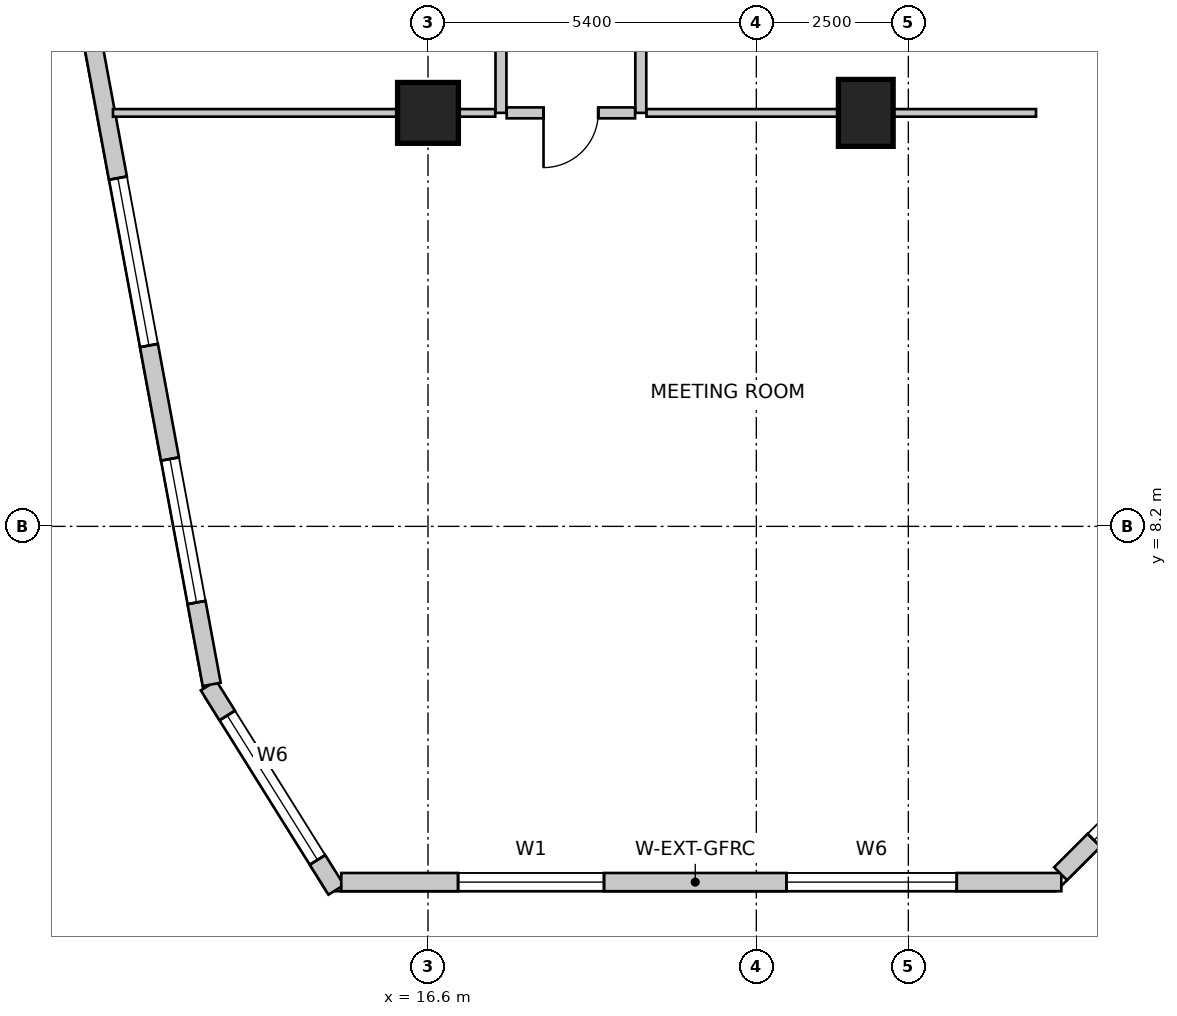
"""IFC4 building model, lengths in metres.
Left out: names, types, materials, properties, quantities, classifications, styles, units other than length and angle.
Written with IfcOpenShell. Run it as: python <this file> out.ifc"""

import sys

from ifc_helpers import new_model, si_unit, direction, frame, frame_2d, origin, origin_2d, place, context, subcontext, project, spatial, rectangle, extrude, source, transform, mapped, element, fill, save


model = new_model("IFC4")
c1 = context("Model", 3, precision=1e-05, world=origin(), true_north=direction((0.0, 1.0)))
c2 = subcontext(c1, "Body", "Model", "MODEL_VIEW")
j1 = project(units=[si_unit("LENGTHUNIT", "METRE"), si_unit("PLANEANGLEUNIT", "RADIAN")], contexts=[c1])
p1 = place(None, origin())
s1 = spatial("IfcSite", under=j1, at=p1, CompositionType="ELEMENT")
p2 = place(p1, origin())
s2 = spatial("IfcBuilding", under=s1, at=p2, CompositionType="ELEMENT")
p3 = place(p2, frame((0.0, 0.0, 47.0)))
s3 = spatial("IfcBuildingStorey", under=s2, at=p3, CompositionType="ELEMENT", Elevation=47.0)
m1 = source(origin(), c2, "Body", "SweptSolid", [
    extrude(rectangle(XDim=0.9, YDim=1.1, at=origin_2d()), origin(), (0.0, 0.0, 1.0), 4.0),
])
p4 = place(p3, frame((23.8, 15.0, 0.0), z_axis=(0.0, 0.0, 1.0), x_axis=(1.0, 0.0, 0.0)))
e1 = element("IfcColumn", 1, at=p4, inside=s3, PredefinedType="COLUMN", context=c2, shape_type="MappedRepresentation", body=[
    mapped(m1, transform((0.0, 0.0, 0.0), scale=1.0)),
])
m2 = source(origin(), c2, "Body", "SweptSolid", [
    extrude(rectangle(XDim=1.0, YDim=1.0, at=origin_2d()), origin(), (0.0, 0.0, 1.0), 4.0),
])
p5 = place(p3, frame((16.6, 15.0, 0.0), z_axis=(0.0, 0.0, 1.0), x_axis=(1.0, 0.0, 0.0)))
e2 = element("IfcColumn", 2, at=p5, inside=s3, PredefinedType="COLUMN", context=c2, shape_type="MappedRepresentation", body=[
    mapped(m2, transform((0.0, 0.0, 0.0), scale=1.0)),
])
p6 = place(p3, frame((12.991, 5.583, 0.0), z_axis=(0.0, 0.0, 1.0), x_axis=(0.530015557218, -0.847987918019, 0.0)))
e3 = element("IfcWall", 3, at=p6, inside=s3, PredefinedType="SOLIDWALL", context=c2, shape_type="SweptSolid", body=[
    extrude(rectangle(XDim=3.962, YDim=0.3, at=frame_2d((1.981, 0.0))), origin(), (0.0, 0.0, 1.0), 3.75),
])
m3 = source(origin(), c2, "Body", "SweptSolid", [
    extrude(rectangle(XDim=2.8, YDim=2.4, at=frame_2d((1.4, 1.2))), frame((0.0, 0.16, 0.0), z_axis=(0.0, -1.0, 0.0), x_axis=(1.0, 0.0, 0.0)), (0.0, 0.0, 1.0), 0.32),
])
p7 = place(p6, frame((0.581, 0.0, 0.85)))
e4 = element("IfcOpeningElement", 4, at=p7, cuts=e3, PredefinedType="OPENING", context=c2, shape_type="MappedRepresentation", body=[
    mapped(m3, transform((0.0, 0.0, 0.0), scale=1.0)),
])
p8 = place(p3, frame((15.174, 2.35, 0.0), z_axis=(0.0, 0.0, 1.0), x_axis=(1.0, 0.0, 0.0)))
e5 = element("IfcWall", 5, at=p8, inside=s3, PredefinedType="SOLIDWALL", context=c2, shape_type="SweptSolid", body=[
    extrude(rectangle(XDim=11.842, YDim=0.3, at=frame_2d((5.921, 0.0))), origin(), (0.0, 0.0, 1.0), 3.75),
])
m4 = source(origin(), c2, "Body", "SweptSolid", [
    extrude(rectangle(XDim=2.4, YDim=2.2, at=frame_2d((1.2, 1.1))), frame((0.0, 0.16, 0.0), z_axis=(0.0, -1.0, 0.0), x_axis=(1.0, 0.0, 0.0)), (0.0, 0.0, 1.0), 0.32),
])
p9 = place(p8, frame((1.921, 0.0, 0.85)))
e6 = element("IfcOpeningElement", 6, at=p9, cuts=e5, PredefinedType="OPENING", context=c2, shape_type="MappedRepresentation", body=[
    mapped(m4, transform((0.0, 0.0, 0.0), scale=1.0)),
])
p10 = place(p8, frame((7.322, 0.0, 0.85)))
e7 = element("IfcOpeningElement", 7, at=p10, cuts=e5, PredefinedType="OPENING", context=c2, shape_type="MappedRepresentation", body=[
    mapped(m3, transform((0.0, 0.0, 0.0), scale=1.0)),
])
p11 = place(p3, frame((27.004, 2.488, 0.0), z_axis=(0.0, 0.0, 1.0), x_axis=(0.707106781187, 0.707106781187, 0.0)))
e8 = element("IfcWall", 8, at=p11, inside=s3, PredefinedType="SOLIDWALL", context=c2, shape_type="SweptSolid", body=[
    extrude(rectangle(XDim=4.356, YDim=0.3, at=frame_2d((2.178, 0.0))), origin(), (0.0, 0.0, 1.0), 3.75),
])
p12 = place(p11, frame((0.778, 0.0, 0.85)))
e9 = element("IfcOpeningElement", 9, at=p12, cuts=e8, PredefinedType="OPENING", context=c2, shape_type="MappedRepresentation", body=[
    mapped(m3, transform((0.0, 0.0, 0.0), scale=1.0)),
])
p13 = place(p3, frame((8.183, 31.833, 0.0), z_axis=(0.0, 0.0, 1.0), x_axis=(0.18216364648, -0.983268226834, 0.0)))
e10 = element("IfcWall", 10, at=p13, inside=s3, PredefinedType="SOLIDWALL", context=c2, shape_type="SweptSolid", body=[
    extrude(rectangle(XDim=26.678, YDim=0.3, at=frame_2d((13.339, 0.0))), origin(), (0.0, 0.0, 1.0), 3.75),
])
p14 = place(p13, frame((2.952, 0.0, 0.85)))
e11 = element("IfcOpeningElement", 11, at=p14, cuts=e10, PredefinedType="OPENING", context=c2, shape_type="MappedRepresentation", body=[
    mapped(m3, transform((0.0, 0.0, 0.0), scale=1.0)),
])
p15 = place(p13, frame((8.986, 0.0, 0.85)))
e12 = element("IfcOpeningElement", 12, at=p15, cuts=e10, PredefinedType="OPENING", context=c2, shape_type="MappedRepresentation", body=[
    mapped(m3, transform((0.0, 0.0, 0.0), scale=1.0)),
])
p16 = place(p13, frame((13.543, 0.0, 0.85)))
e13 = element("IfcOpeningElement", 13, at=p16, cuts=e10, PredefinedType="OPENING", context=c2, shape_type="MappedRepresentation", body=[
    mapped(m4, transform((0.0, 0.0, 0.0), scale=1.0)),
])
p17 = place(p13, frame((18.211, 0.0, 0.85)))
e14 = element("IfcOpeningElement", 14, at=p17, cuts=e10, PredefinedType="OPENING", context=c2, shape_type="MappedRepresentation", body=[
    mapped(m3, transform((0.0, 0.0, 0.0), scale=1.0)),
])
p18 = place(p13, frame((22.909, 0.0, 0.85)))
e15 = element("IfcOpeningElement", 15, at=p18, cuts=e10, PredefinedType="OPENING", context=c2, shape_type="MappedRepresentation", body=[
    mapped(m4, transform((0.0, 0.0, 0.0), scale=1.0)),
])
p19 = place(p3, frame((17.8, 15.0, 0.0), z_axis=(0.0, 0.0, 1.0), x_axis=(0.0, 1.0, 0.0)))
e16 = element("IfcWall", 16, at=p19, inside=s3, PredefinedType="PARTITIONING", context=c2, shape_type="SweptSolid", body=[
    extrude(rectangle(XDim=8.838, YDim=0.18, at=frame_2d((4.419, 0.0))), origin(), (0.0, 0.0, 1.0), 2.892),
])
m5 = source(origin(), c2, "Body", "SweptSolid", [
    extrude(rectangle(XDim=0.9, YDim=2.15, at=frame_2d((0.45, 1.075))), frame((0.0, 0.1, 0.0), z_axis=(0.0, -1.0, 0.0), x_axis=(1.0, 0.0, 0.0)), (0.0, 0.0, 1.0), 0.2),
])
p20 = place(p19, frame((3.908, 0.0, 0.0)))
e17 = element("IfcOpeningElement", 17, at=p20, cuts=e16, PredefinedType="OPENING", context=c2, shape_type="MappedRepresentation", body=[
    mapped(m5, transform((0.0, 0.0, 0.0), scale=1.0)),
])
p21 = place(p3, frame((20.1, 31.056, 0.0), z_axis=(0.0, 0.0, 1.0), x_axis=(0.0, -1.0, 0.0)))
e18 = element("IfcWall", 18, at=p21, inside=s3, PredefinedType="PARTITIONING", context=c2, shape_type="SweptSolid", body=[
    extrude(rectangle(XDim=16.056, YDim=0.18, at=frame_2d((8.028, 0.0))), origin(), (0.0, 0.0, 1.0), 2.892),
])
p22 = place(p21, frame((7.518, 0.0, 0.0)))
e19 = element("IfcOpeningElement", 19, at=p22, cuts=e18, PredefinedType="OPENING", context=c2, shape_type="MappedRepresentation", body=[
    mapped(m5, transform((0.0, 0.0, 0.0), scale=1.0)),
])
p23 = place(p3, frame((20.006, 15.0, 0.0), z_axis=(0.0, 0.0, 1.0), x_axis=(-1.0, 0.0, 0.0)))
e20 = element("IfcWall", 20, at=p23, inside=s3, PredefinedType="PARTITIONING", context=c2, shape_type="SweptSolid", body=[
    extrude(rectangle(XDim=2.112, YDim=0.18, at=frame_2d((1.056, 0.0))), origin(), (0.0, 0.0, 1.0), 2.892),
])
p24 = place(p23, frame((0.606, 0.0, 0.0)))
e21 = element("IfcOpeningElement", 21, at=p24, cuts=e20, PredefinedType="OPENING", context=c2, shape_type="MappedRepresentation", body=[
    mapped(m5, transform((0.0, 0.0, 0.0), scale=1.0)),
])
p25 = place(p3, frame((17.706, 15.0, 0.0), z_axis=(0.0, 0.0, 1.0), x_axis=(-1.0, 0.0, 0.0)))
e22 = element("IfcWall", 22, at=p25, inside=s3, PredefinedType="PARTITIONING", context=c2, shape_type="SweptSolid", body=[
    extrude(rectangle(XDim=6.287, YDim=0.125, at=frame_2d((3.144, 0.0))), origin(), (0.0, 0.0, 1.0), 2.892),
])
p26 = place(p3, frame((26.6, 15.0, 0.0), z_axis=(0.0, 0.0, 1.0), x_axis=(-1.0, 0.0, 0.0)))
e23 = element("IfcWall", 23, at=p26, inside=s3, PredefinedType="PARTITIONING", context=c2, shape_type="SweptSolid", body=[
    extrude(rectangle(XDim=6.406, YDim=0.125, at=frame_2d((3.203, 0.0))), origin(), (0.0, 0.0, 1.0), 2.892),
])
m6 = source(origin(), c2, "Body", "SweptSolid", [
    extrude(rectangle(XDim=2.8, YDim=2.4, at=frame_2d((1.4, 1.2))), frame((0.0, -0.015, 0.0), z_axis=(0.0, -1.0, 0.0), x_axis=(1.0, 0.0, 0.0)), (0.0, 0.0, 1.0), 0.06),
])
p27 = place(p7, origin())
e24 = element("IfcWindow", 24, at=p27, inside=s3, PartitioningType="SINGLE_PANEL", PredefinedType="WINDOW", context=c2, shape_type="MappedRepresentation", body=[
    mapped(m6, transform((0.0, 0.0, 0.0), scale=1.0)),
])
fill(e4, e24)
m7 = source(origin(), c2, "Body", "SweptSolid", [
    extrude(rectangle(XDim=2.4, YDim=2.2, at=frame_2d((1.2, 1.1))), frame((0.0, -0.015, 0.0), z_axis=(0.0, -1.0, 0.0), x_axis=(1.0, 0.0, 0.0)), (0.0, 0.0, 1.0), 0.06),
])
p28 = place(p9, origin())
e25 = element("IfcWindow", 25, at=p28, inside=s3, PartitioningType="SINGLE_PANEL", PredefinedType="WINDOW", context=c2, shape_type="MappedRepresentation", body=[
    mapped(m7, transform((0.0, 0.0, 0.0), scale=1.0)),
])
fill(e6, e25)
p29 = place(p10, origin())
e26 = element("IfcWindow", 26, at=p29, inside=s3, PartitioningType="SINGLE_PANEL", PredefinedType="WINDOW", context=c2, shape_type="MappedRepresentation", body=[
    mapped(m6, transform((0.0, 0.0, 0.0), scale=1.0)),
])
fill(e7, e26)
p30 = place(p12, origin())
e27 = element("IfcWindow", 27, at=p30, inside=s3, PartitioningType="SINGLE_PANEL", PredefinedType="WINDOW", context=c2, shape_type="MappedRepresentation", body=[
    mapped(m6, transform((0.0, 0.0, 0.0), scale=1.0)),
])
fill(e9, e27)
p31 = place(p17, origin())
e28 = element("IfcWindow", 28, at=p31, inside=s3, PartitioningType="SINGLE_PANEL", PredefinedType="WINDOW", context=c2, shape_type="MappedRepresentation", body=[
    mapped(m6, transform((0.0, 0.0, 0.0), scale=1.0)),
])
fill(e14, e28)
p32 = place(p18, origin())
e29 = element("IfcWindow", 29, at=p32, inside=s3, PartitioningType="SINGLE_PANEL", PredefinedType="WINDOW", context=c2, shape_type="MappedRepresentation", body=[
    mapped(m7, transform((0.0, 0.0, 0.0), scale=1.0)),
])
fill(e15, e29)
m8 = source(origin(), c2, "Body", "SweptSolid", [
    extrude(rectangle(XDim=0.9, YDim=2.15, at=frame_2d((0.45, 1.075))), frame((0.0, 0.025, 0.0), z_axis=(0.0, -1.0, 0.0), x_axis=(1.0, 0.0, 0.0)), (0.0, 0.0, 1.0), 0.05),
])
p33 = place(p24, origin())
e30 = element("IfcDoor", 30, at=p33, inside=s3, OperationType="SINGLE_SWING_RIGHT", PredefinedType="DOOR", context=c2, shape_type="MappedRepresentation", body=[
    mapped(m8, transform((0.0, 0.0, 0.0), scale=1.0)),
])
fill(e21, e30)
save(model, sys.argv[1])
